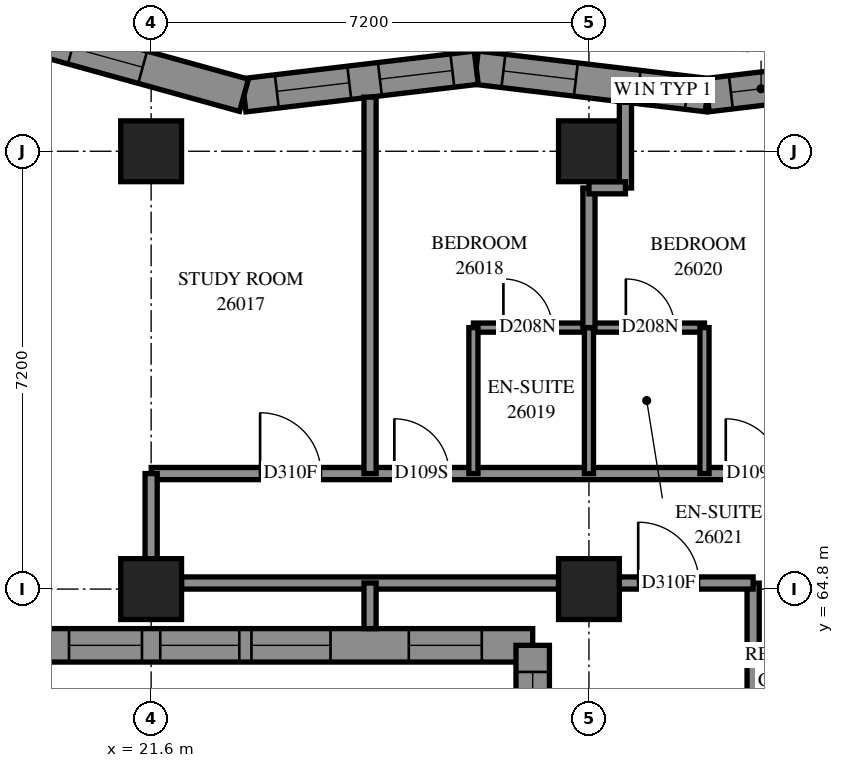
"""IFC4 building model, lengths in metres.
Left out: names, types, materials, properties, quantities, classifications, styles, units other than length and angle.
Written with IfcOpenShell. Run it as: python <this file> out.ifc"""

import sys

from ifc_helpers import new_model, si_unit, direction, frame, frame_2d, origin, origin_2d, place, context, subcontext, project, spatial, polyline, rectangle, outline, extrude, element, fill, save


model = new_model("IFC4")
c1 = context("Model", 3, precision=1e-05, world=origin(), true_north=direction((0.0, 1.0)))
c2 = subcontext(c1, "Body", "Model", "MODEL_VIEW")
j1 = project(units=[si_unit("LENGTHUNIT", "METRE"), si_unit("PLANEANGLEUNIT", "RADIAN")], contexts=[c1])
p1 = place(None, origin())
s1 = spatial("IfcSite", under=j1, at=p1, CompositionType="ELEMENT")
p2 = place(p1, origin())
s2 = spatial("IfcBuilding", under=s1, at=p2, CompositionType="ELEMENT")
p3 = place(p2, frame((0.0, 0.0, 98.2)))
s3 = spatial("IfcBuildingStorey", under=s2, at=p3, CompositionType="ELEMENT", Elevation=98.2)
for number, where, z_axis, x_axis in (
    (1, (21.6, 64.8, 0.0), (0.0, 0.0, 1.0), (1.0, 0.0, 0.0)),
    (2, (21.6, 72.0, 0.0), (0.0, 0.0, 1.0), (1.0, 0.0, 0.0)),
    (3, (28.8, 64.8, 0.0), (0.0, 0.0, 1.0), (1.0, 0.0, 0.0)),
    (4, (28.8, 72.0, 0.0), (0.0, 0.0, 1.0), (1.0, 0.0, 0.0)),
):
    element("IfcColumn", number, at=place(p3, frame(where, z_axis=z_axis, x_axis=x_axis)), inside=s3, PredefinedType="COLUMN", context=c2, shape_type="SweptSolid", body=[
        extrude(rectangle(XDim=1.0, YDim=1.0, at=origin_2d()), origin(), (0.0, 0.0, 1.0), 3.1),
    ])
p4 = place(p3, frame((34.545, 73.374, 0.0), z_axis=(0.0, 0.0, 1.0), x_axis=(-0.9930269402, -0.1178876415, 0.0)))
e5 = element("IfcWall", 5, at=p4, inside=s3, PredefinedType="SOLIDWALL", context=c2, shape_type="SweptSolid", body=[
    extrude(outline(polyline([(-0.033, -0.275), (3.793, -0.275), (3.858, 0.275), (0.033, 0.275), (-0.033, -0.275)])), origin(), (0.0, 0.0, 1.0), 3.1),
])
p5 = place(p4, frame((0.596, 0.0, 0.5)))
e6 = element("IfcOpeningElement", 6, at=p5, cuts=e5, PredefinedType="OPENING", context=c2, shape_type="SweptSolid", body=[
    extrude(rectangle(XDim=1.2, YDim=2.45, at=frame_2d((0.6, 1.225))), frame((0.0, 0.285, 0.0), z_axis=(0.0, -1.0, 0.0), x_axis=(1.0, 0.0, 0.0)), (0.0, 0.0, 1.0), 0.57),
])
p6 = place(p4, frame((2.434, 0.0, 0.45)))
e7 = element("IfcOpeningElement", 7, at=p6, cuts=e5, PredefinedType="OPENING", context=c2, shape_type="SweptSolid", body=[
    extrude(rectangle(XDim=1.0, YDim=2.5, at=frame_2d((0.5, 1.25))), frame((0.0, 0.285, 0.0), z_axis=(0.0, -1.0, 0.0), x_axis=(1.0, 0.0, 0.0)), (0.0, 0.0, 1.0), 0.57),
])
p7 = place(p3, frame((30.746, 72.923, 0.0), z_axis=(0.0, 0.0, 1.0), x_axis=(-0.9930269402, 0.1178876415, 0.0)))
e8 = element("IfcWall", 8, at=p7, inside=s3, PredefinedType="SOLIDWALL", context=c2, shape_type="SweptSolid", body=[
    extrude(outline(polyline([(0.033, -0.275), (3.858, -0.275), (3.793, 0.275), (-0.033, 0.275), (0.033, -0.275)])), origin(), (0.0, 0.0, 1.0), 3.1),
])
p8 = place(p7, frame((2.176, 0.0, 0.5)))
e9 = element("IfcOpeningElement", 9, at=p8, cuts=e8, PredefinedType="OPENING", context=c2, shape_type="SweptSolid", body=[
    extrude(rectangle(XDim=1.2, YDim=2.45, at=frame_2d((0.6, 1.225))), frame((0.0, 0.285, 0.0), z_axis=(0.0, -1.0, 0.0), x_axis=(1.0, 0.0, 0.0)), (0.0, 0.0, 1.0), 0.57),
])
p9 = place(p7, frame((0.337, 0.0, 0.45)))
e10 = element("IfcOpeningElement", 10, at=p9, cuts=e8, PredefinedType="OPENING", context=c2, shape_type="SweptSolid", body=[
    extrude(rectangle(XDim=0.8, YDim=2.5, at=frame_2d((0.4, 1.25))), frame((0.0, 0.285, 0.0), z_axis=(0.0, -1.0, 0.0), x_axis=(1.0, 0.0, 0.0)), (0.0, 0.0, 1.0), 0.57),
])
p10 = place(p3, frame((26.947, 73.374, 0.0), z_axis=(0.0, 0.0, 1.0), x_axis=(-0.9930244072, -0.1179089763, 0.0)))
e11 = element("IfcWall", 11, at=p10, inside=s3, PredefinedType="SOLIDWALL", context=c2, shape_type="SweptSolid", body=[
    extrude(outline(polyline([(-0.033, -0.275), (3.793, -0.275), (3.901, 0.275), (0.033, 0.275), (-0.033, -0.275)])), origin(), (0.0, 0.0, 1.0), 3.1),
])
p11 = place(p10, frame((0.396, 0.0, 0.5)))
e12 = element("IfcOpeningElement", 12, at=p11, cuts=e11, PredefinedType="OPENING", context=c2, shape_type="SweptSolid", body=[
    extrude(rectangle(XDim=1.2, YDim=2.45, at=frame_2d((0.6, 1.225))), frame((0.0, 0.285, 0.0), z_axis=(0.0, -1.0, 0.0), x_axis=(1.0, 0.0, 0.0)), (0.0, 0.0, 1.0), 0.57),
])
p12 = place(p10, frame((2.103, 0.0, 0.5)))
e13 = element("IfcOpeningElement", 13, at=p12, cuts=e11, PredefinedType="OPENING", context=c2, shape_type="SweptSolid", body=[
    extrude(rectangle(XDim=1.2, YDim=2.45, at=frame_2d((0.6, 1.225))), frame((0.0, 0.285, 0.0), z_axis=(0.0, -1.0, 0.0), x_axis=(1.0, 0.0, 0.0)), (0.0, 0.0, 1.0), 0.57),
])
p13 = place(p3, frame((23.127, 72.921, 0.0), z_axis=(0.0, 0.0, 1.0), x_axis=(-0.9637921646, 0.266654577, 0.0)))
e14 = element("IfcWall", 14, at=p13, inside=s3, PredefinedType="SOLIDWALL", context=c2, shape_type="SweptSolid", body=[
    extrude(outline(polyline([(0.054, -0.275), (3.996, -0.275), (3.273, 0.275), (-0.054, 0.275), (0.054, -0.275)])), origin(), (0.0, 0.0, 1.0), 3.1),
])
p14 = place(p13, frame((1.728, 0.0, 0.5)))
e15 = element("IfcOpeningElement", 15, at=p14, cuts=e14, PredefinedType="OPENING", context=c2, shape_type="SweptSolid", body=[
    extrude(rectangle(XDim=1.2, YDim=2.45, at=frame_2d((0.6, 1.225))), frame((0.0, 0.285, 0.0), z_axis=(0.0, -1.0, 0.0), x_axis=(1.0, 0.0, 0.0)), (0.0, 0.0, 1.0), 0.57),
])
p15 = place(p3, frame((19.624, 63.875, 0.0), z_axis=(0.0, 0.0, 1.0), x_axis=(1.0, 0.0, 0.0)))
e16 = element("IfcWall", 16, at=p15, inside=s3, PredefinedType="SOLIDWALL", context=c2, shape_type="SweptSolid", body=[
    extrude(outline(polyline([(-0.275, -0.275), (7.976, -0.275), (8.526, 0.275), (0.275, 0.275), (-0.275, -0.275)])), origin(), (0.0, 0.0, 1.0), 3.1),
])
p16 = place(p15, frame((2.126, 0.0, 0.5)))
e17 = element("IfcOpeningElement", 17, at=p16, cuts=e16, PredefinedType="OPENING", context=c2, shape_type="SweptSolid", body=[
    extrude(rectangle(XDim=1.3, YDim=2.45, at=frame_2d((0.65, 1.225))), frame((0.0, 0.285, 0.0), z_axis=(0.0, -1.0, 0.0), x_axis=(1.0, 0.0, 0.0)), (0.0, 0.0, 1.0), 0.57),
])
p17 = place(p15, frame((3.626, 0.0, 0.5)))
e18 = element("IfcOpeningElement", 18, at=p17, cuts=e16, PredefinedType="OPENING", context=c2, shape_type="SweptSolid", body=[
    extrude(rectangle(XDim=1.3, YDim=2.45, at=frame_2d((0.65, 1.225))), frame((0.0, 0.285, 0.0), z_axis=(0.0, -1.0, 0.0), x_axis=(1.0, 0.0, 0.0)), (0.0, 0.0, 1.0), 0.57),
])
p18 = place(p15, frame((0.625, 0.0, 0.5)))
e19 = element("IfcOpeningElement", 19, at=p18, cuts=e16, PredefinedType="OPENING", context=c2, shape_type="SweptSolid", body=[
    extrude(rectangle(XDim=1.2, YDim=2.45, at=frame_2d((0.6, 1.225))), frame((0.0, 0.285, 0.0), z_axis=(0.0, -1.0, 0.0), x_axis=(1.0, 0.0, 0.0)), (0.0, 0.0, 1.0), 0.57),
])
p19 = place(p15, frame((6.213, 0.0, 0.5)))
e20 = element("IfcOpeningElement", 20, at=p19, cuts=e16, PredefinedType="OPENING", context=c2, shape_type="SweptSolid", body=[
    extrude(rectangle(XDim=1.2, YDim=2.45, at=frame_2d((0.6, 1.225))), frame((0.0, 0.285, 0.0), z_axis=(0.0, -1.0, 0.0), x_axis=(1.0, 0.0, 0.0)), (0.0, 0.0, 1.0), 0.57),
])
p20 = place(p3, frame((27.875, 63.875, 0.0), z_axis=(0.0, 0.0, 1.0), x_axis=(0.0, -1.0, 0.0)))
e21 = element("IfcWall", 21, at=p20, inside=s3, PredefinedType="SOLIDWALL", context=c2, shape_type="SweptSolid", body=[
    extrude(outline(polyline([(0.275, -0.275), (8.526, -0.275), (7.976, 0.275), (-0.275, 0.275), (0.275, -0.275)])), origin(), (0.0, 0.0, 1.0), 3.1),
])
p21 = place(p20, frame((4.825, 0.0, 0.5)))
e22 = element("IfcOpeningElement", 22, at=p21, cuts=e21, PredefinedType="OPENING", context=c2, shape_type="SweptSolid", body=[
    extrude(rectangle(XDim=1.3, YDim=2.45, at=frame_2d((0.65, 1.225))), frame((0.0, 0.285, 0.0), z_axis=(0.0, -1.0, 0.0), x_axis=(1.0, 0.0, 0.0)), (0.0, 0.0, 1.0), 0.57),
])
p22 = place(p20, frame((0.438, 0.0, 0.5)))
e23 = element("IfcOpeningElement", 23, at=p22, cuts=e21, PredefinedType="OPENING", context=c2, shape_type="SweptSolid", body=[
    extrude(rectangle(XDim=1.2, YDim=2.45, at=frame_2d((0.6, 1.225))), frame((0.0, 0.285, 0.0), z_axis=(0.0, -1.0, 0.0), x_axis=(1.0, 0.0, 0.0)), (0.0, 0.0, 1.0), 0.57),
])
p23 = place(p20, frame((6.426, 0.0, 0.5)))
e24 = element("IfcOpeningElement", 24, at=p23, cuts=e21, PredefinedType="OPENING", context=c2, shape_type="SweptSolid", body=[
    extrude(rectangle(XDim=1.2, YDim=2.45, at=frame_2d((0.6, 1.225))), frame((0.0, 0.285, 0.0), z_axis=(0.0, -1.0, 0.0), x_axis=(1.0, 0.0, 0.0)), (0.0, 0.0, 1.0), 0.57),
])
p24 = place(p20, frame((1.931, 0.0, 0.5)))
e25 = element("IfcOpeningElement", 25, at=p24, cuts=e21, PredefinedType="OPENING", context=c2, shape_type="SweptSolid", body=[
    extrude(rectangle(XDim=1.3, YDim=2.45, at=frame_2d((0.65, 1.225))), frame((0.0, 0.285, 0.0), z_axis=(0.0, -1.0, 0.0), x_axis=(1.0, 0.0, 0.0)), (0.0, 0.0, 1.0), 0.57),
])
p25 = place(p20, frame((3.725, 0.0, 0.45)))
e26 = element("IfcOpeningElement", 26, at=p25, cuts=e21, PredefinedType="OPENING", context=c2, shape_type="SweptSolid", body=[
    extrude(rectangle(XDim=1.0, YDim=2.5, at=frame_2d((0.5, 1.25))), frame((0.0, 0.285, 0.0), z_axis=(0.0, -1.0, 0.0), x_axis=(1.0, 0.0, 0.0)), (0.0, 0.0, 1.0), 0.57),
])
p26 = place(p3, frame((21.602, 66.7, 0.0), z_axis=(0.0, 0.0, 1.0), x_axis=(1.0, 0.0, 0.0)))
e27 = element("IfcWall", 27, at=p26, inside=s3, PredefinedType="PARTITIONING", context=c2, shape_type="SweptSolid", body=[
    extrude(rectangle(XDim=11.698, YDim=0.2, at=frame_2d((5.849, 0.0))), origin(), (0.0, 0.0, 1.0), 3.1),
])
p27 = place(p26, frame((1.79, 0.0, 0.0)))
e28 = element("IfcOpeningElement", 28, at=p27, cuts=e27, PredefinedType="OPENING", context=c2, shape_type="SweptSolid", body=[
    extrude(rectangle(XDim=1.0, YDim=2.1, at=frame_2d((0.5, 1.05))), frame((0.0, 0.11, 0.0), z_axis=(0.0, -1.0, 0.0), x_axis=(1.0, 0.0, 0.0)), (0.0, 0.0, 1.0), 0.22),
])
p28 = place(p26, frame((3.998, 0.0, 0.0)))
e29 = element("IfcOpeningElement", 29, at=p28, cuts=e27, PredefinedType="OPENING", context=c2, shape_type="SweptSolid", body=[
    extrude(rectangle(XDim=0.9, YDim=2.1, at=frame_2d((0.45, 1.05))), frame((0.0, 0.11, 0.0), z_axis=(0.0, -1.0, 0.0), x_axis=(1.0, 0.0, 0.0)), (0.0, 0.0, 1.0), 0.22),
])
p29 = place(p26, frame((9.448, 0.0, 0.0)))
e30 = element("IfcOpeningElement", 30, at=p29, cuts=e27, PredefinedType="OPENING", context=c2, shape_type="SweptSolid", body=[
    extrude(rectangle(XDim=0.9, YDim=2.1, at=frame_2d((0.45, 1.05))), frame((0.0, 0.11, 0.0), z_axis=(0.0, -1.0, 0.0), x_axis=(1.0, 0.0, 0.0)), (0.0, 0.0, 1.0), 0.22),
])
p30 = place(p3, frame((22.1, 64.9, 0.0), z_axis=(0.0, 0.0, 1.0), x_axis=(1.0, 0.0, 0.0)))
e31 = element("IfcWall", 31, at=p30, inside=s3, PredefinedType="PARTITIONING", context=c2, shape_type="SweptSolid", body=[
    extrude(rectangle(XDim=6.2, YDim=0.2, at=frame_2d((3.1, 0.0))), origin(), (0.0, 0.0, 1.0), 2.6),
])
p31 = place(p3, frame((25.2, 66.7, 0.0), z_axis=(0.0, 0.0, 1.0), x_axis=(0.0, 1.0, 0.0)))
e32 = element("IfcWall", 32, at=p31, inside=s3, PredefinedType="PARTITIONING", context=c2, shape_type="SweptSolid", body=[
    extrude(rectangle(XDim=6.19, YDim=0.2, at=frame_2d((3.095, 0.0))), origin(), (0.0, 0.0, 1.0), 3.1),
])
p32 = place(p3, frame((26.9, 69.1, 0.0), z_axis=(0.0, 0.0, 1.0), x_axis=(1.0, 0.0, 0.0)))
e33 = element("IfcWall", 33, at=p32, inside=s3, PredefinedType="PARTITIONING", context=c2, shape_type="SweptSolid", body=[
    extrude(rectangle(XDim=3.8, YDim=0.15, at=frame_2d((1.9, 0.0))), origin(), (0.0, 0.0, 1.0), 3.1),
])
p33 = place(p32, frame((0.493, 0.0, 0.0)))
e34 = element("IfcOpeningElement", 34, at=p33, cuts=e33, PredefinedType="OPENING", context=c2, shape_type="SweptSolid", body=[
    extrude(rectangle(XDim=0.8, YDim=2.1, at=frame_2d((0.4, 1.05))), frame((0.0, 0.085, 0.0), z_axis=(0.0, -1.0, 0.0), x_axis=(1.0, 0.0, 0.0)), (0.0, 0.0, 1.0), 0.17),
])
p34 = place(p32, frame((2.507, 0.0, 0.0)))
e35 = element("IfcOpeningElement", 35, at=p34, cuts=e33, PredefinedType="OPENING", context=c2, shape_type="SweptSolid", body=[
    extrude(rectangle(XDim=0.8, YDim=2.1, at=frame_2d((0.4, 1.05))), frame((0.0, 0.085, 0.0), z_axis=(0.0, -1.0, 0.0), x_axis=(1.0, 0.0, 0.0)), (0.0, 0.0, 1.0), 0.17),
])
p35 = place(p3, frame((31.5, 62.102, 0.0), z_axis=(0.0, 0.0, 1.0), x_axis=(0.0, 1.0, 0.0)))
e36 = element("IfcWall", 36, at=p35, inside=s3, PredefinedType="PARTITIONING", context=c2, shape_type="SweptSolid", body=[
    extrude(rectangle(XDim=2.796, YDim=0.2, at=frame_2d((1.398, 0.0))), origin(), (0.0, 0.0, 1.0), 3.1),
])
for number, where, z_axis, x_axis in (
    (37, (26.9, 66.7, 0.0), (0.0, 0.0, 1.0), (0.0, 1.0, 0.0)),
    (38, (28.8, 66.7, 0.0), (0.0, 0.0, 1.0), (0.0, 1.0, 0.0)),
    (39, (30.7, 66.7, 0.0), (0.0, 0.0, 1.0), (0.0, 1.0, 0.0)),
):
    element("IfcWall", number, at=place(p3, frame(where, z_axis=z_axis, x_axis=x_axis)), inside=s3, PredefinedType="PARTITIONING", context=c2, shape_type="SweptSolid", body=[
        extrude(rectangle(XDim=2.4, YDim=0.15, at=frame_2d((1.2, 0.0))), origin(), (0.0, 0.0, 1.0), 3.1),
    ])
p36 = place(p3, frame((28.8, 69.1, 0.0), z_axis=(0.0, 0.0, 1.0), x_axis=(0.0, 1.0, 0.0)))
e40 = element("IfcWall", 40, at=p36, inside=s3, PredefinedType="PARTITIONING", context=c2, shape_type="SweptSolid", body=[
    extrude(rectangle(XDim=2.296, YDim=0.2, at=frame_2d((1.148, 0.0))), origin(), (0.0, 0.0, 1.0), 3.1),
])
p37 = place(p3, frame((29.3, 64.9, 0.0), z_axis=(0.0, 0.0, 1.0), x_axis=(1.0, 0.0, 0.0)))
e41 = element("IfcWall", 41, at=p37, inside=s3, PredefinedType="PARTITIONING", context=c2, shape_type="SweptSolid", body=[
    extrude(rectangle(XDim=2.2, YDim=0.2, at=frame_2d((1.1, 0.0))), origin(), (0.0, 0.0, 1.0), 3.1),
])
p38 = place(p37, frame((0.31, 0.0, 0.0)))
e42 = element("IfcOpeningElement", 42, at=p38, cuts=e41, PredefinedType="OPENING", context=c2, shape_type="SweptSolid", body=[
    extrude(rectangle(XDim=1.0, YDim=2.1, at=frame_2d((0.5, 1.05))), frame((0.0, 0.11, 0.0), z_axis=(0.0, -1.0, 0.0), x_axis=(1.0, 0.0, 0.0)), (0.0, 0.0, 1.0), 0.22),
])
p39 = place(p3, frame((21.6, 65.3, 0.0), z_axis=(0.0, 0.0, 1.0), x_axis=(0.0, 1.0, 0.0)))
e43 = element("IfcWall", 43, at=p39, inside=s3, PredefinedType="PARTITIONING", context=c2, shape_type="SweptSolid", body=[
    extrude(rectangle(XDim=1.4, YDim=0.2, at=frame_2d((0.7, 0.0))), origin(), (0.0, 0.0, 1.0), 2.6),
])
p40 = place(p3, frame((29.4, 71.396, 0.0), z_axis=(0.0, 0.0, 1.0), x_axis=(0.0, 1.0, 0.0)))
e44 = element("IfcWall", 44, at=p40, inside=s3, PredefinedType="PARTITIONING", context=c2, shape_type="SweptSolid", body=[
    extrude(rectangle(XDim=1.41, YDim=0.2, at=frame_2d((0.705, 0.0))), origin(), (0.0, 0.0, 1.0), 3.1),
])
p41 = place(p3, frame((25.2, 64.15, 0.0), z_axis=(0.0, 0.0, 1.0), x_axis=(0.0, 1.0, 0.0)))
e45 = element("IfcWall", 45, at=p41, inside=s3, PredefinedType="PARTITIONING", context=c2, shape_type="SweptSolid", body=[
    extrude(rectangle(XDim=0.75, YDim=0.2, at=frame_2d((0.375, 0.0))), origin(), (0.0, 0.0, 1.0), 3.1),
])
p42 = place(p3, frame((28.8, 71.4, 0.0), z_axis=(0.0, 0.0, 1.0), x_axis=(1.0, 0.0, 0.0)))
e46 = element("IfcWall", 46, at=p42, inside=s3, PredefinedType="PARTITIONING", context=c2, shape_type="SweptSolid", body=[
    extrude(rectangle(XDim=0.6, YDim=0.2, at=frame_2d((0.3, 0.0))), origin(), (0.0, 0.0, 1.0), 3.1),
])
p43 = place(p8, origin())
e47 = element("IfcWindow", 47, at=p43, inside=s3, PartitioningType="SINGLE_PANEL", PredefinedType="WINDOW", context=c2, shape_type="SweptSolid", body=[
    extrude(rectangle(XDim=1.2, YDim=2.45, at=frame_2d((0.6, 1.225))), frame((0.0, 0.155, 0.0), z_axis=(0.0, -1.0, 0.0), x_axis=(1.0, 0.0, 0.0)), (0.0, 0.0, 1.0), 0.06),
])
fill(e9, e47)
p44 = place(p11, origin())
e48 = element("IfcWindow", 48, at=p44, inside=s3, PartitioningType="SINGLE_PANEL", PredefinedType="WINDOW", context=c2, shape_type="SweptSolid", body=[
    extrude(rectangle(XDim=1.2, YDim=2.45, at=frame_2d((0.6, 1.225))), frame((0.0, 0.155, 0.0), z_axis=(0.0, -1.0, 0.0), x_axis=(1.0, 0.0, 0.0)), (0.0, 0.0, 1.0), 0.06),
])
fill(e12, e48)
p45 = place(p12, origin())
e49 = element("IfcWindow", 49, at=p45, inside=s3, PartitioningType="SINGLE_PANEL", PredefinedType="WINDOW", context=c2, shape_type="SweptSolid", body=[
    extrude(rectangle(XDim=1.2, YDim=2.45, at=frame_2d((0.6, 1.225))), frame((0.0, 0.155, 0.0), z_axis=(0.0, -1.0, 0.0), x_axis=(1.0, 0.0, 0.0)), (0.0, 0.0, 1.0), 0.06),
])
fill(e13, e49)
p46 = place(p14, origin())
e50 = element("IfcWindow", 50, at=p46, inside=s3, PartitioningType="SINGLE_PANEL", PredefinedType="WINDOW", context=c2, shape_type="SweptSolid", body=[
    extrude(rectangle(XDim=1.2, YDim=2.45, at=frame_2d((0.6, 1.225))), frame((0.0, 0.155, 0.0), z_axis=(0.0, -1.0, 0.0), x_axis=(1.0, 0.0, 0.0)), (0.0, 0.0, 1.0), 0.06),
])
fill(e15, e50)
p47 = place(p16, origin())
e51 = element("IfcWindow", 51, at=p47, inside=s3, PartitioningType="SINGLE_PANEL", PredefinedType="WINDOW", context=c2, shape_type="SweptSolid", body=[
    extrude(rectangle(XDim=1.3, YDim=2.45, at=frame_2d((0.65, 1.225))), frame((0.0, 0.155, 0.0), z_axis=(0.0, -1.0, 0.0), x_axis=(1.0, 0.0, 0.0)), (0.0, 0.0, 1.0), 0.06),
])
fill(e17, e51)
p48 = place(p17, origin())
e52 = element("IfcWindow", 52, at=p48, inside=s3, PartitioningType="SINGLE_PANEL", PredefinedType="WINDOW", context=c2, shape_type="SweptSolid", body=[
    extrude(rectangle(XDim=1.3, YDim=2.45, at=frame_2d((0.65, 1.225))), frame((0.0, 0.155, 0.0), z_axis=(0.0, -1.0, 0.0), x_axis=(1.0, 0.0, 0.0)), (0.0, 0.0, 1.0), 0.06),
])
fill(e18, e52)
p49 = place(p18, origin())
e53 = element("IfcWindow", 53, at=p49, inside=s3, PartitioningType="SINGLE_PANEL", PredefinedType="WINDOW", context=c2, shape_type="SweptSolid", body=[
    extrude(rectangle(XDim=1.2, YDim=2.45, at=frame_2d((0.6, 1.225))), frame((0.0, 0.155, 0.0), z_axis=(0.0, -1.0, 0.0), x_axis=(1.0, 0.0, 0.0)), (0.0, 0.0, 1.0), 0.06),
])
fill(e19, e53)
p50 = place(p19, origin())
e54 = element("IfcWindow", 54, at=p50, inside=s3, PartitioningType="SINGLE_PANEL", PredefinedType="WINDOW", context=c2, shape_type="SweptSolid", body=[
    extrude(rectangle(XDim=1.2, YDim=2.45, at=frame_2d((0.6, 1.225))), frame((0.0, 0.155, 0.0), z_axis=(0.0, -1.0, 0.0), x_axis=(1.0, 0.0, 0.0)), (0.0, 0.0, 1.0), 0.06),
])
fill(e20, e54)
p51 = place(p22, origin())
e55 = element("IfcWindow", 55, at=p51, inside=s3, PartitioningType="SINGLE_PANEL", PredefinedType="WINDOW", context=c2, shape_type="SweptSolid", body=[
    extrude(rectangle(XDim=1.2, YDim=2.45, at=frame_2d((0.6, 1.225))), frame((0.0, 0.155, 0.0), z_axis=(0.0, -1.0, 0.0), x_axis=(1.0, 0.0, 0.0)), (0.0, 0.0, 1.0), 0.06),
])
fill(e23, e55)
p52 = place(p27, origin())
e56 = element("IfcDoor", 56, at=p52, inside=s3, OperationType="SINGLE_SWING_RIGHT", PredefinedType="DOOR", context=c2, shape_type="SweptSolid", body=[
    extrude(rectangle(XDim=1.0, YDim=2.1, at=frame_2d((0.5, 1.05))), frame((0.0, 0.025, 0.0), z_axis=(0.0, -1.0, 0.0), x_axis=(1.0, 0.0, 0.0)), (0.0, 0.0, 1.0), 0.05),
])
fill(e28, e56)
p53 = place(p28, origin())
e57 = element("IfcDoor", 57, at=p53, inside=s3, OperationType="SINGLE_SWING_LEFT", PredefinedType="DOOR", context=c2, shape_type="SweptSolid", body=[
    extrude(rectangle(XDim=0.9, YDim=2.1, at=frame_2d((0.45, 1.05))), frame((0.0, 0.025, 0.0), z_axis=(0.0, -1.0, 0.0), x_axis=(1.0, 0.0, 0.0)), (0.0, 0.0, 1.0), 0.05),
])
fill(e29, e57)
p54 = place(p33, origin())
e58 = element("IfcDoor", 58, at=p54, inside=s3, OperationType="SINGLE_SWING_RIGHT", PredefinedType="DOOR", context=c2, shape_type="SweptSolid", body=[
    extrude(rectangle(XDim=0.8, YDim=2.1, at=frame_2d((0.4, 1.05))), frame((0.0, 0.025, 0.0), z_axis=(0.0, -1.0, 0.0), x_axis=(1.0, 0.0, 0.0)), (0.0, 0.0, 1.0), 0.05),
])
fill(e34, e58)
p55 = place(p29, origin())
e59 = element("IfcDoor", 59, at=p55, inside=s3, OperationType="SINGLE_SWING_RIGHT", PredefinedType="DOOR", context=c2, shape_type="SweptSolid", body=[
    extrude(rectangle(XDim=0.9, YDim=2.1, at=frame_2d((0.45, 1.05))), frame((0.0, 0.025, 0.0), z_axis=(0.0, -1.0, 0.0), x_axis=(1.0, 0.0, 0.0)), (0.0, 0.0, 1.0), 0.05),
])
fill(e30, e59)
p56 = place(p34, origin())
e60 = element("IfcDoor", 60, at=p56, inside=s3, OperationType="SINGLE_SWING_RIGHT", PredefinedType="DOOR", context=c2, shape_type="SweptSolid", body=[
    extrude(rectangle(XDim=0.8, YDim=2.1, at=frame_2d((0.4, 1.05))), frame((0.0, 0.025, 0.0), z_axis=(0.0, -1.0, 0.0), x_axis=(1.0, 0.0, 0.0)), (0.0, 0.0, 1.0), 0.05),
])
fill(e35, e60)
p57 = place(p38, origin())
e61 = element("IfcDoor", 61, at=p57, inside=s3, OperationType="SINGLE_SWING_RIGHT", PredefinedType="DOOR", context=c2, shape_type="SweptSolid", body=[
    extrude(rectangle(XDim=1.0, YDim=2.1, at=frame_2d((0.5, 1.05))), frame((0.0, 0.025, 0.0), z_axis=(0.0, -1.0, 0.0), x_axis=(1.0, 0.0, 0.0)), (0.0, 0.0, 1.0), 0.05),
])
fill(e42, e61)
p58 = place(p6, origin())
e62 = element("IfcWindow", 62, at=p58, inside=s3, PartitioningType="SINGLE_PANEL", PredefinedType="WINDOW", context=c2, shape_type="SweptSolid", body=[
    extrude(rectangle(XDim=1.0, YDim=2.5, at=frame_2d((0.5, 1.25))), frame((0.0, 0.155, 0.0), z_axis=(0.0, -1.0, 0.0), x_axis=(1.0, 0.0, 0.0)), (0.0, 0.0, 1.0), 0.06),
])
fill(e7, e62)
p59 = place(p9, origin())
e63 = element("IfcWindow", 63, at=p59, inside=s3, PartitioningType="SINGLE_PANEL", PredefinedType="WINDOW", context=c2, shape_type="SweptSolid", body=[
    extrude(rectangle(XDim=0.8, YDim=2.5, at=frame_2d((0.4, 1.25))), frame((0.0, 0.155, 0.0), z_axis=(0.0, -1.0, 0.0), x_axis=(1.0, 0.0, 0.0)), (0.0, 0.0, 1.0), 0.06),
])
fill(e10, e63)
save(model, sys.argv[1])
